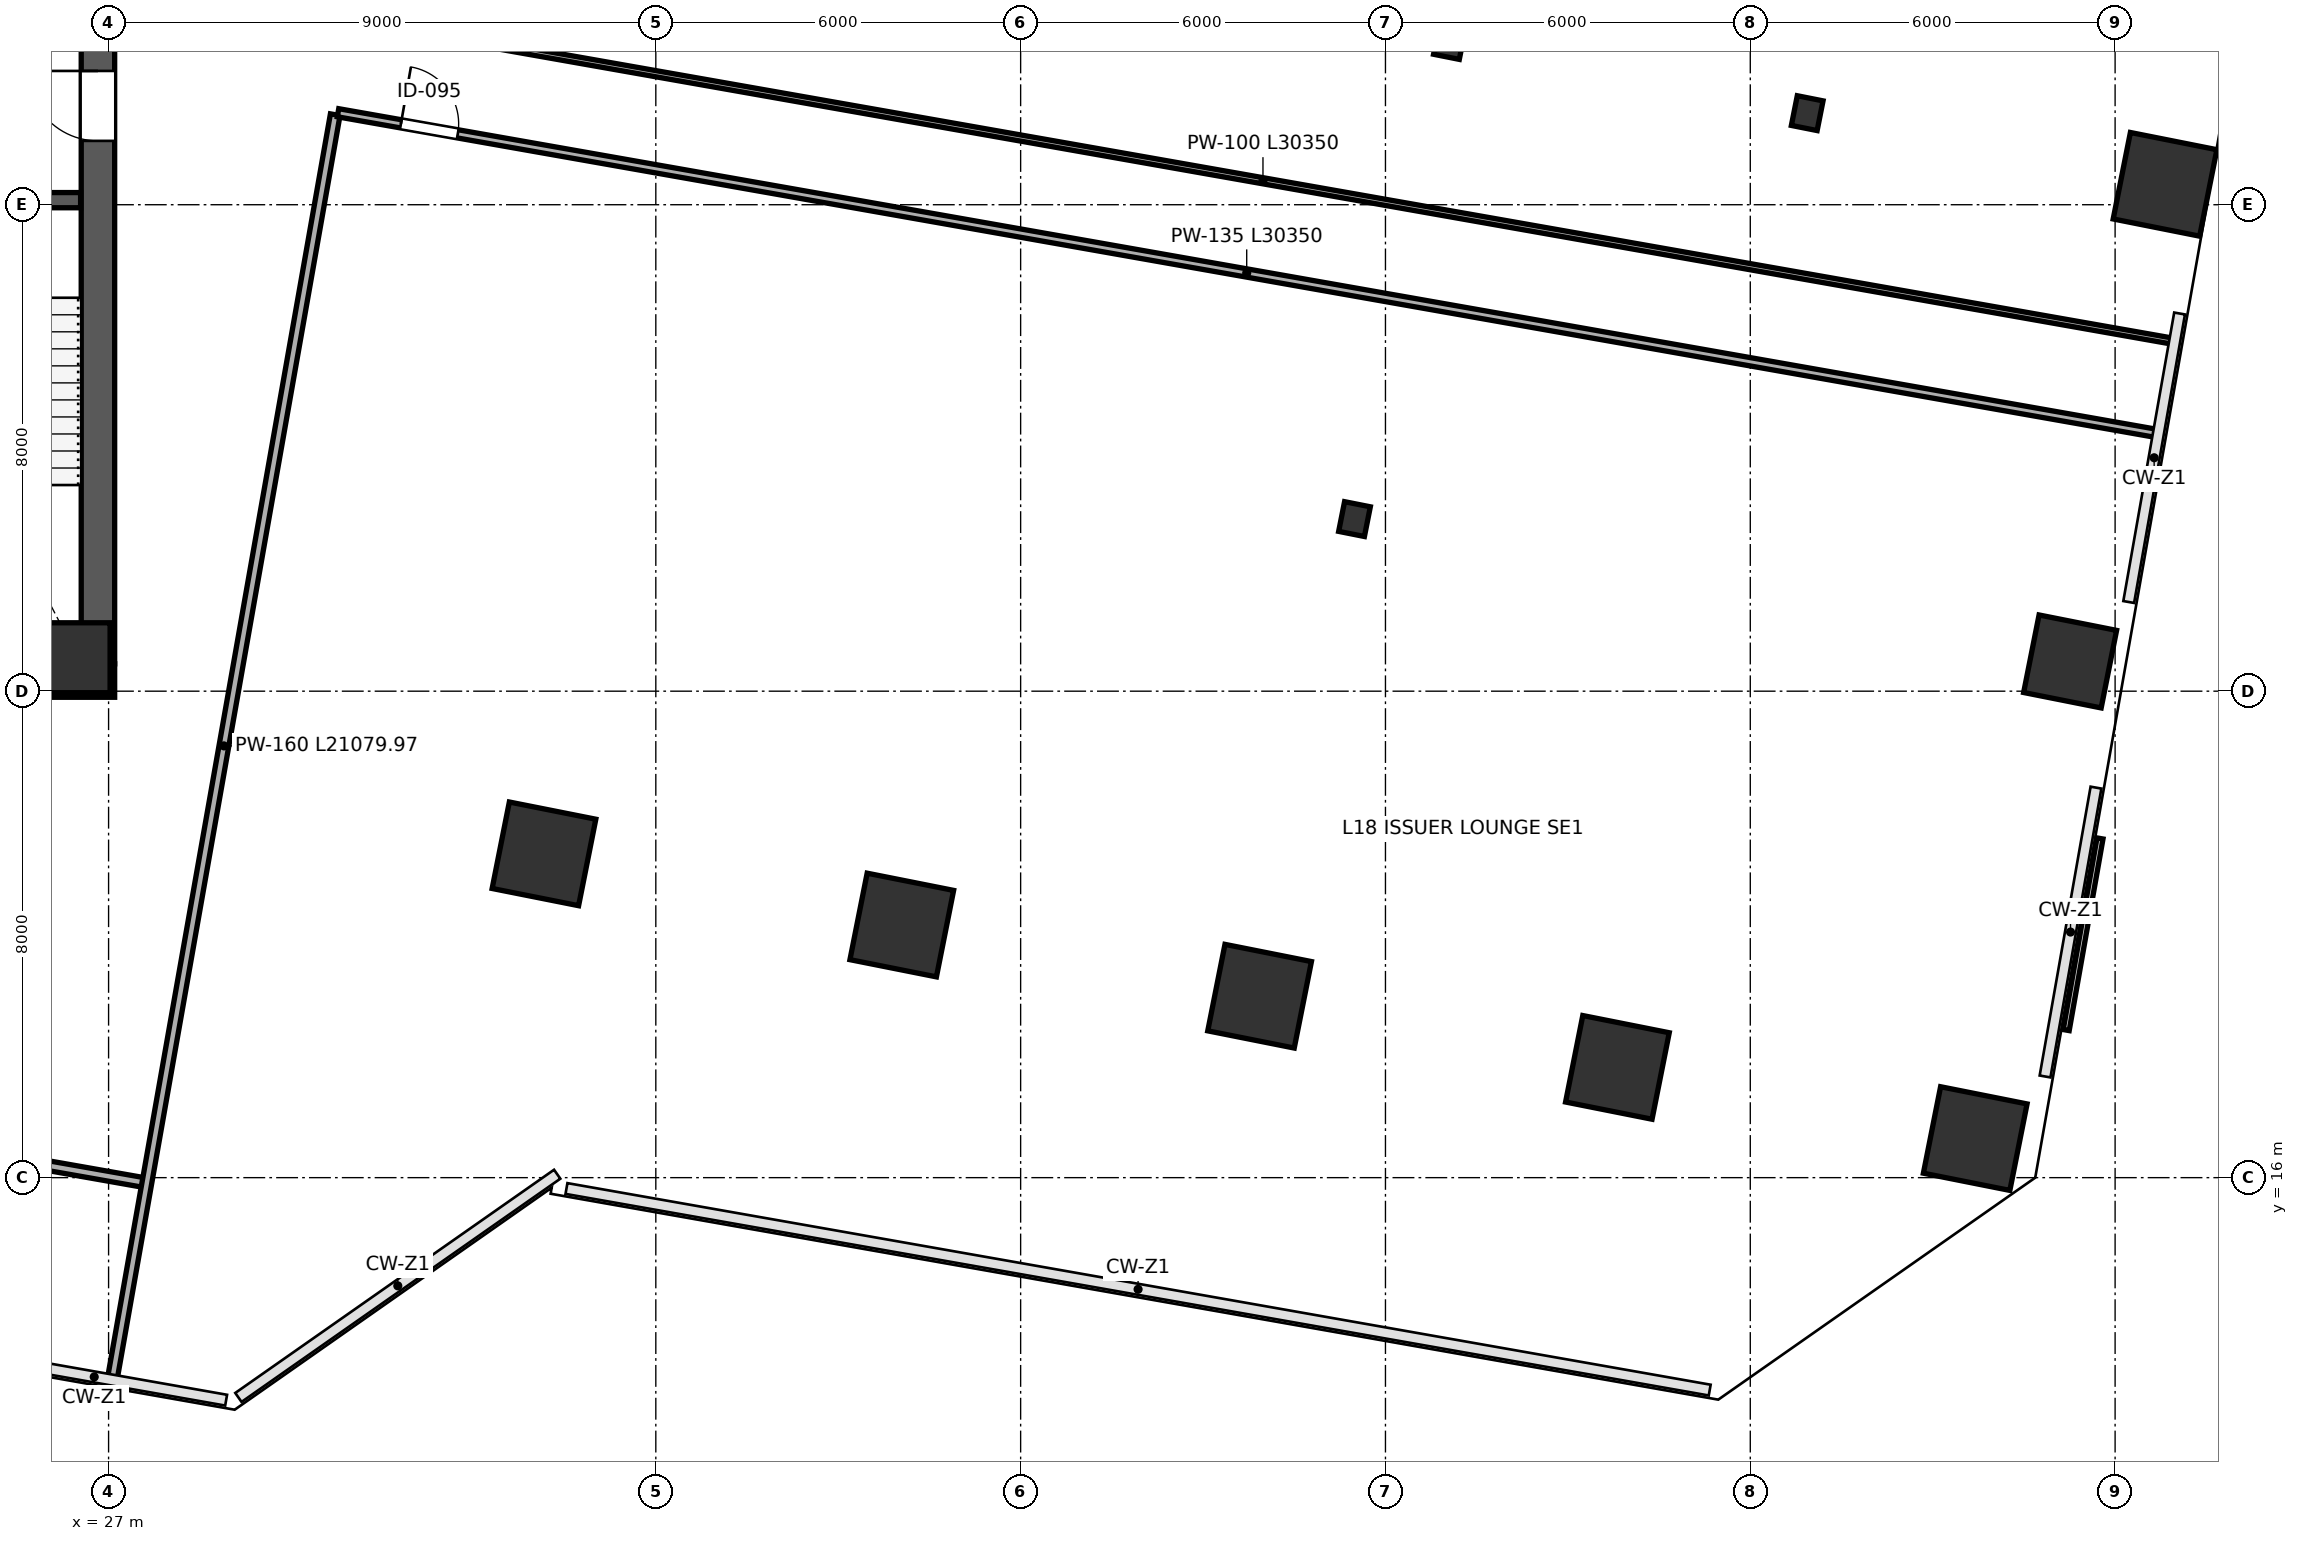
"""IFC4 building model, lengths in metres.
Left out: names, types, materials, properties, quantities, classifications, styles, units other than length and angle.
Written with IfcOpenShell. Run it as: python <this file> out.ifc"""

import sys

from ifc_helpers import new_model, si_unit, direction, frame, frame_2d, origin, origin_2d, place, context, subcontext, project, spatial, rectangle, i_section, extrude, clip, halfspace, source, transform, mapped, element, fill, save


model = new_model("IFC4")
c1 = context("Model", 3, precision=1e-05, world=origin(), true_north=direction((0.0, 1.0)))
c2 = subcontext(c1, "Body", "Model", "MODEL_VIEW")
j1 = project(units=[si_unit("LENGTHUNIT", "METRE"), si_unit("PLANEANGLEUNIT", "RADIAN")], contexts=[c1])
p1 = place(None, origin())
s1 = spatial("IfcSite", under=j1, at=p1, CompositionType="ELEMENT")
p2 = place(p1, origin())
s2 = spatial("IfcBuilding", under=s1, at=p2, CompositionType="ELEMENT")
p3 = place(p2, frame((0.0, 0.0, 83.2)))
s3 = spatial("IfcBuildingStorey", under=s2, at=p3, CompositionType="ELEMENT", Elevation=83.2)
m1 = source(origin(), c2, "Body", "SweptSolid", [
    extrude(rectangle(XDim=1.15, YDim=1.15, at=origin_2d()), origin(), (0.0, 0.0, 1.0), 4.198),
])
p4 = place(p3, frame((26.45, 24.55, 0.001), z_axis=(0.0, 0.0, 1.0), x_axis=(1.0, 0.0, 0.0)))
e1 = element("IfcColumn", 1, at=p4, inside=s3, PredefinedType="COLUMN", context=c2, shape_type="MappedRepresentation", body=[
    mapped(m1, transform((0.0, 0.0, 0.0), scale=1.0)),
])
p5 = place(p3, frame((34.161, 21.325, 0.0), z_axis=(-0.055946393667, -0.064923299483, 0.996320714539), x_axis=(-0.616095914632, 0.787493663638, 0.016719859525)))
e2 = element("IfcColumn", 2, at=p5, inside=s3, PredefinedType="COLUMN", context=c2, shape_type="Clipping", body=[
    clip(clip(extrude(rectangle(XDim=1.45, YDim=1.45, at=origin_2d()), origin(), (0.0, 0.0, 1.0), 4.216), halfspace(frame((0.0, 0.0, 0.074), z_axis=(0.0, 0.0, -1.0), x_axis=(1.0, 0.0, 0.0)), False)), halfspace(frame((0.0, 0.0, 4.142), z_axis=(0.0, 0.0, 1.0), x_axis=(1.0, 0.0, 0.0)), False)),
])
p6 = place(p3, frame((40.045, 20.154, 0.0), z_axis=(-0.062142880438, -0.095004682454, 0.993535290124), x_axis=(-0.714688689092, 0.699091962174, 0.022147372453)))
e3 = element("IfcColumn", 3, at=p6, inside=s3, PredefinedType="COLUMN", context=c2, shape_type="Clipping", body=[
    clip(clip(extrude(rectangle(XDim=1.45, YDim=1.45, at=origin_2d()), origin(), (0.0, 0.0, 1.0), 4.227), halfspace(frame((0.0, 0.0, 0.098), z_axis=(0.0, 0.0, -1.0), x_axis=(1.0, 0.0, 0.0)), False)), halfspace(frame((0.0, 0.0, 4.129), z_axis=(0.0, 0.0, 1.0), x_axis=(1.0, 0.0, 0.0)), False)),
])
p7 = place(p3, frame((45.93, 18.984, 0.0), z_axis=(-0.068297268536, -0.12485684307, 0.989821323194), x_axis=(-0.767794892837, 0.640093852606, 0.02776440867)))
e4 = element("IfcColumn", 4, at=p7, inside=s3, PredefinedType="COLUMN", context=c2, shape_type="Clipping", body=[
    clip(clip(extrude(rectangle(XDim=1.45, YDim=1.45, at=origin_2d()), origin(), (0.0, 0.0, 1.0), 4.243), halfspace(frame((0.0, 0.0, 0.123), z_axis=(0.0, 0.0, -1.0), x_axis=(1.0, 0.0, 0.0)), False)), halfspace(frame((0.0, 0.0, 4.12), z_axis=(0.0, 0.0, 1.0), x_axis=(1.0, 0.0, 0.0)), False)),
])
p8 = place(p3, frame((47.491, 26.83, 0.0), z_axis=(-0.028044655576, -0.133428063593, 0.990661621917), x_axis=(-0.920059478184, 0.390874703648, 0.026599297941)))
e5 = element("IfcColumn", 5, at=p8, inside=s3, PredefinedType="COLUMN", context=c2, shape_type="Clipping", body=[
    clip(clip(extrude(i_section(OverallWidth=0.432, OverallDepth=0.498, WebThickness=0.056, FlangeThickness=0.089, FilletRadius=0.015, at=origin_2d()), origin(), (0.0, 0.0, 1.0), 4.24), halfspace(frame((0.0, 0.0, 0.04), z_axis=(0.0, 0.0, -1.0), x_axis=(1.0, 0.0, 0.0)), False)), halfspace(frame((0.0, 0.0, 4.199), z_axis=(0.0, 0.0, 1.0), x_axis=(1.0, 0.0, 0.0)), False)),
])
p9 = place(p3, frame((49.052, 34.677, 0.0), z_axis=(0.012255457878, -0.141829594687, 0.98981522004), x_axis=(-0.993768135654, 0.107951703672, 0.027772688627)))
e6 = element("IfcColumn", 6, at=p9, inside=s3, PredefinedType="COLUMN", context=c2, shape_type="Clipping", body=[
    clip(clip(extrude(i_section(OverallWidth=0.432, OverallDepth=0.498, WebThickness=0.056, FlangeThickness=0.089, FilletRadius=0.015, at=origin_2d()), origin(), (0.0, 0.0, 1.0), 4.243), halfspace(frame((0.0, 0.0, 0.042), z_axis=(0.0, 0.0, -1.0), x_axis=(1.0, 0.0, 0.0)), False)), halfspace(frame((0.0, 0.0, 4.201), z_axis=(0.0, 0.0, 1.0), x_axis=(1.0, 0.0, 0.0)), False)),
])
p10 = place(p3, frame((51.815, 17.813, 0.0), z_axis=(-0.074279589479, -0.154343480065, 0.985221108558), x_axis=(-0.800413591464, 0.598516014342, 0.033416510523)))
e7 = element("IfcColumn", 7, at=p10, inside=s3, PredefinedType="COLUMN", context=c2, shape_type="Clipping", body=[
    clip(clip(extrude(rectangle(XDim=1.45, YDim=1.45, at=origin_2d()), origin(), (0.0, 0.0, 1.0), 4.263), halfspace(frame((0.0, 0.0, 0.149), z_axis=(0.0, 0.0, -1.0), x_axis=(1.0, 0.0, 0.0)), False)), halfspace(frame((0.0, 0.0, 4.114), z_axis=(0.0, 0.0, 1.0), x_axis=(1.0, 0.0, 0.0)), False)),
])
p11 = place(p3, frame((54.936, 33.506, 0.0), z_axis=(0.005841578208, -0.171181149654, 0.985222254097), x_axis=(-0.98676998796, 0.158645559647, 0.033415225051)))
e8 = element("IfcColumn", 8, at=p11, inside=s3, PredefinedType="COLUMN", context=c2, shape_type="Clipping", body=[
    clip(clip(extrude(i_section(OverallWidth=0.432, OverallDepth=0.498, WebThickness=0.056, FlangeThickness=0.089, FilletRadius=0.015, at=origin_2d()), origin(), (0.0, 0.0, 1.0), 4.263), halfspace(frame((0.0, 0.0, 0.051), z_axis=(0.0, 0.0, -1.0), x_axis=(1.0, 0.0, 0.0)), False)), halfspace(frame((0.0, 0.0, 4.212), z_axis=(0.0, 0.0, 1.0), x_axis=(1.0, 0.0, 0.0)), False)),
])
p12 = place(p3, frame((57.699, 16.643, 0.0), z_axis=(-0.08013422256, -0.183334799163, 0.979778984154), x_axis=(-0.822133401943, 0.567955102679, 0.039034225367)))
e9 = element("IfcColumn", 9, at=p12, inside=s3, PredefinedType="COLUMN", context=c2, shape_type="Clipping", body=[
    clip(clip(extrude(rectangle(XDim=1.45, YDim=1.45, at=origin_2d()), origin(), (0.0, 0.0, 1.0), 4.287), halfspace(frame((0.0, 0.0, 0.175), z_axis=(0.0, 0.0, -1.0), x_axis=(1.0, 0.0, 0.0)), False)), halfspace(frame((0.0, 0.0, 4.112), z_axis=(0.0, 0.0, 1.0), x_axis=(1.0, 0.0, 0.0)), False)),
])
p13 = place(p3, frame((59.26, 24.489, 0.0), z_axis=(-0.040356383482, -0.191920823704, 0.980580317843), x_axis=(-0.920430264071, 0.389029879479, 0.038260709018)))
e10 = element("IfcColumn", 10, at=p13, inside=s3, PredefinedType="COLUMN", context=c2, shape_type="Clipping", body=[
    clip(clip(extrude(rectangle(XDim=1.3, YDim=1.3, at=origin_2d()), origin(), (0.0, 0.0, 1.0), 4.283), halfspace(frame((0.0, 0.0, 0.154), z_axis=(0.0, 0.0, -1.0), x_axis=(1.0, 0.0, 0.0)), False)), halfspace(frame((0.0, 0.0, 4.13), z_axis=(0.0, 0.0, 1.0), x_axis=(1.0, 0.0, 0.0)), False)),
])
p14 = place(p3, frame((60.821, 32.335, 0.0), z_axis=(-0.000512580103, -0.20013405349, 0.979768389924), x_axis=(-0.980292512005, 0.193654666945, 0.039044345)))
e11 = element("IfcColumn", 11, at=p14, inside=s3, PredefinedType="COLUMN", context=c2, shape_type="Clipping", body=[
    clip(clip(extrude(rectangle(XDim=1.45, YDim=1.45, at=origin_2d()), origin(), (0.0, 0.0, 1.0), 4.287), halfspace(frame((0.0, 0.0, 0.175), z_axis=(0.0, 0.0, -1.0), x_axis=(1.0, 0.0, 0.0)), False)), halfspace(frame((0.0, 0.0, 4.112), z_axis=(0.0, 0.0, 1.0), x_axis=(1.0, 0.0, 0.0)), False)),
])
p15 = place(p3, frame((26.825, 24.45, 0.0), z_axis=(0.0, 0.0, 1.0), x_axis=(0.0, 1.0, 0.0)))
e12 = element("IfcWall", 12, at=p15, inside=s3, PredefinedType="SHEAR", context=c2, shape_type="SweptSolid", body=[
    extrude(rectangle(XDim=15.1, YDim=0.55, at=frame_2d((7.55, 0.0))), origin(), (0.0, 0.0, 1.0), 3.96),
])
p16 = place(p15, frame((8.6, 0.0, 0.0)))
e13 = element("IfcOpeningElement", 13, at=p16, cuts=e12, PredefinedType="OPENING", context=c2, shape_type="SweptSolid", body=[
    extrude(rectangle(XDim=1.15, YDim=2.2, at=frame_2d((0.575, 1.1))), frame((0.0, 0.285, 0.0), z_axis=(0.0, -1.0, 0.0), x_axis=(1.0, 0.0, 0.0)), (0.0, 0.0, 1.0), 0.57),
])
p17 = place(p3, frame((8.9, 24.175, 0.0), z_axis=(0.0, 0.0, 1.0), x_axis=(1.0, 0.0, 0.0)))
e14 = element("IfcWall", 14, at=p17, inside=s3, PredefinedType="SHEAR", context=c2, shape_type="SweptSolid", body=[
    extrude(rectangle(XDim=18.2, YDim=0.55, at=frame_2d((9.1, 0.0))), origin(), (0.0, 0.0, 1.0), 3.96),
])
p18 = place(p3, frame((23.19, 32.075, 0.0), z_axis=(0.0, 0.0, 1.0), x_axis=(1.0, 0.0, 0.0)))
e15 = element("IfcWall", 15, at=p18, inside=s3, PredefinedType="SHEAR", context=c2, shape_type="SweptSolid", body=[
    extrude(rectangle(XDim=3.35, YDim=0.25, at=frame_2d((1.675, 0.0))), origin(), (0.0, 0.0, 1.0), 3.96),
])
p19 = place(p18, frame((0.85, 0.0, 0.0)))
e16 = element("IfcOpeningElement", 16, at=p19, cuts=e15, PredefinedType="OPENING", context=c2, shape_type="SweptSolid", body=[
    extrude(rectangle(XDim=1.15, YDim=2.2, at=frame_2d((0.575, 1.1))), frame((0.0, 0.135, 0.0), z_axis=(0.0, -1.0, 0.0), x_axis=(1.0, 0.0, 0.0)), (0.0, 0.0, 1.0), 0.27),
])
p20 = place(p3, frame((9.765, 19.061, 0.0), z_axis=(0.0, 0.0, 1.0), x_axis=(0.984807312871, -0.173650673815, 0.0)))
e17 = element("IfcWall", 17, at=p20, inside=s3, PredefinedType="PARTITIONING", context=c2, shape_type="SweptSolid", body=[
    extrude(rectangle(XDim=18.1, YDim=0.16, at=frame_2d((9.05, 0.0))), origin(), (0.0, 0.0, 1.0), 3.96),
])
p21 = place(p20, frame((1.45, 0.0, 0.0)))
e18 = element("IfcOpeningElement", 18, at=p21, cuts=e17, PredefinedType="OPENING", context=c2, shape_type="SweptSolid", body=[
    extrude(rectangle(XDim=0.95, YDim=2.15, at=frame_2d((0.475, 1.075))), frame((0.0, 0.09, 0.0), z_axis=(0.0, -1.0, 0.0), x_axis=(1.0, 0.0, 0.0)), (0.0, 0.0, 1.0), 0.18),
])
p22 = place(p3, frame((27.067, 12.72, 0.0), z_axis=(0.0, 0.0, 1.0), x_axis=(0.173654514703, 0.984806635601, 0.0)))
e19 = element("IfcWall", 19, at=p22, inside=s3, PredefinedType="PARTITIONING", context=c2, shape_type="SweptSolid", body=[
    extrude(rectangle(XDim=21.08, YDim=0.16, at=frame_2d((10.54, 0.0))), origin(), (0.0, 0.0, 1.0), 3.96),
])
p23 = place(p3, frame((31.041, 35.029, 0.0), z_axis=(0.0, 0.0, 1.0), x_axis=(0.984807519997, -0.173649499156, 0.0)))
e20 = element("IfcWall", 20, at=p23, inside=s3, PredefinedType="PARTITIONING", context=c2, shape_type="SweptSolid", body=[
    extrude(rectangle(XDim=30.35, YDim=0.1, at=frame_2d((15.175, 0.0))), origin(), (0.0, 0.0, 1.0), 3.095),
])
p24 = place(p23, frame((1.05, 0.0, 0.0)))
e21 = element("IfcOpeningElement", 21, at=p24, cuts=e20, PredefinedType="OPENING", context=c2, shape_type="SweptSolid", body=[
    extrude(rectangle(XDim=0.95, YDim=2.15, at=frame_2d((0.475, 1.075))), frame((0.0, 0.06, 0.0), z_axis=(0.0, -1.0, 0.0), x_axis=(1.0, 0.0, 0.0)), (0.0, 0.0, 1.0), 0.12),
])
p25 = place(p3, frame((30.774, 33.513, 0.0), z_axis=(0.0, 0.0, 1.0), x_axis=(0.984807519997, -0.173649499156, 0.0)))
e22 = element("IfcWall", 22, at=p25, inside=s3, PredefinedType="PARTITIONING", context=c2, shape_type="SweptSolid", body=[
    extrude(rectangle(XDim=30.35, YDim=0.135, at=frame_2d((15.175, 0.0))), origin(), (0.0, 0.0, 1.0), 3.095),
])
p26 = place(p25, frame((1.05, 0.0, 0.0)))
e23 = element("IfcOpeningElement", 23, at=p26, cuts=e22, PredefinedType="OPENING", context=c2, shape_type="SweptSolid", body=[
    extrude(rectangle(XDim=0.95, YDim=2.15, at=frame_2d((0.475, 1.075))), frame((0.0, 0.078, 0.0), z_axis=(0.0, -1.0, 0.0), x_axis=(1.0, 0.0, 0.0)), (0.0, 0.0, 1.0), 0.155),
])
m2 = source(origin(), c2, "Body", "SweptSolid", [
    extrude(rectangle(XDim=1.15, YDim=2.2, at=frame_2d((0.575, 1.1))), frame((0.0, 0.025, 0.0), z_axis=(0.0, -1.0, 0.0), x_axis=(1.0, 0.0, 0.0)), (0.0, 0.0, 1.0), 0.05),
])
p27 = place(p16, origin())
e24 = element("IfcDoor", 24, at=p27, inside=s3, OperationType="SINGLE_SWING_RIGHT", PredefinedType="DOOR", context=c2, shape_type="MappedRepresentation", body=[
    mapped(m2, transform((0.0, 0.0, 0.0), scale=1.0)),
])
fill(e13, e24)
m3 = source(origin(), c2, "Body", "SweptSolid", [
    extrude(rectangle(XDim=0.95, YDim=2.15, at=frame_2d((0.475, 1.075))), frame((0.0, 0.025, 0.0), z_axis=(0.0, -1.0, 0.0), x_axis=(1.0, 0.0, 0.0)), (0.0, 0.0, 1.0), 0.05),
])
p28 = place(p26, origin())
e25 = element("IfcDoor", 25, at=p28, inside=s3, OperationType="SINGLE_SWING_LEFT", PredefinedType="DOOR", context=c2, shape_type="MappedRepresentation", body=[
    mapped(m3, transform((0.0, 0.0, 0.0), scale=1.0)),
])
fill(e23, e25)
save(model, sys.argv[1])
